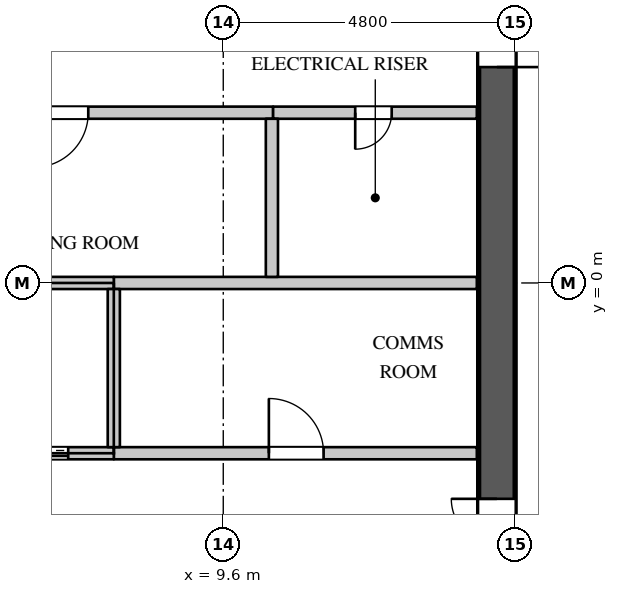
"""IFC4 building model, lengths in metres.
Left out: names, types, materials, properties, quantities, classifications, styles, units other than length and angle.
Written with IfcOpenShell. Run it as: python <this file> out.ifc"""

import sys

from ifc_helpers import new_model, si_unit, direction, frame, frame_2d, origin, place, context, subcontext, project, spatial, rectangle, extrude, element, fill, save


model = new_model("IFC4")
c1 = context("Model", 3, precision=1e-05, world=origin(), true_north=direction((0.0, 1.0)))
c2 = subcontext(c1, "Body", "Model", "MODEL_VIEW")
j1 = project(units=[si_unit("LENGTHUNIT", "METRE"), si_unit("PLANEANGLEUNIT", "RADIAN")], contexts=[c1])
p1 = place(None, origin())
s1 = spatial("IfcSite", under=j1, at=p1, CompositionType="ELEMENT")
p2 = place(p1, origin())
s2 = spatial("IfcBuilding", under=s1, at=p2, CompositionType="ELEMENT")
p3 = place(p2, frame((0.0, 0.0, 306.3)))
s3 = spatial("IfcBuildingStorey", under=s2, at=p3, CompositionType="ELEMENT", Elevation=306.3)
p4 = place(p3, frame((14.1, -11.4, 0.0), z_axis=(0.0, 0.0, 1.0), x_axis=(0.0, 1.0, 0.0)))
e1 = element("IfcWall", 1, at=p4, inside=s3, PredefinedType="SHEAR", context=c2, shape_type="SweptSolid", body=[
    extrude(rectangle(XDim=22.8, YDim=0.6, at=frame_2d((11.4, 0.0))), origin(), (0.0, 0.0, 1.0), 4.2),
])
p5 = place(p4, frame((20.45, 0.0, 0.0)))
e2 = element("IfcOpeningElement", 2, at=p5, cuts=e1, PredefinedType="OPENING", context=c2, shape_type="SweptSolid", body=[
    extrude(rectangle(XDim=1.1, YDim=2.2, at=frame_2d((0.55, 1.1))), frame((0.0, 0.31, 0.0), z_axis=(0.0, -1.0, 0.0), x_axis=(1.0, 0.0, 0.0)), (0.0, 0.0, 1.0), 0.62),
])
p6 = place(p4, frame((1.25, 0.0, 0.0)))
e3 = element("IfcOpeningElement", 3, at=p6, cuts=e1, PredefinedType="OPENING", context=c2, shape_type="SweptSolid", body=[
    extrude(rectangle(XDim=1.1, YDim=2.2, at=frame_2d((0.55, 1.1))), frame((0.0, 0.31, 0.0), z_axis=(0.0, -1.0, 0.0), x_axis=(1.0, 0.0, 0.0)), (0.0, 0.0, 1.0), 0.62),
])
p7 = place(p4, frame((14.95, 0.0, 0.0)))
e4 = element("IfcOpeningElement", 4, at=p7, cuts=e1, PredefinedType="OPENING", context=c2, shape_type="SweptSolid", body=[
    extrude(rectangle(XDim=1.5, YDim=2.4, at=frame_2d((0.75, 1.2))), frame((0.0, 0.31, 0.0), z_axis=(0.0, -1.0, 0.0), x_axis=(1.0, 0.0, 0.0)), (0.0, 0.0, 1.0), 0.62),
])
p8 = place(p4, frame((6.35, 0.0, 0.0)))
e5 = element("IfcOpeningElement", 5, at=p8, cuts=e1, PredefinedType="OPENING", context=c2, shape_type="SweptSolid", body=[
    extrude(rectangle(XDim=1.5, YDim=2.4, at=frame_2d((0.75, 1.2))), frame((0.0, 0.31, 0.0), z_axis=(0.0, -1.0, 0.0), x_axis=(1.0, 0.0, 0.0)), (0.0, 0.0, 1.0), 0.62),
])
p9 = place(p3, frame((-7.82, 2.8, 0.0), z_axis=(0.0, 0.0, 1.0), x_axis=(1.0, 0.0, 0.0)))
e6 = element("IfcWall", 6, at=p9, inside=s3, PredefinedType="PARTITIONING", context=c2, shape_type="SweptSolid", body=[
    extrude(rectangle(XDim=18.24, YDim=0.2, at=frame_2d((9.12, 0.0))), origin(), (0.0, 0.0, 1.0), 3.9),
])
p10 = place(p9, frame((2.0, 0.0, 0.0)))
e7 = element("IfcOpeningElement", 7, at=p10, cuts=e6, PredefinedType="OPENING", context=c2, shape_type="SweptSolid", body=[
    extrude(rectangle(XDim=0.9, YDim=2.2, at=frame_2d((0.45, 1.1))), frame((0.0, 0.11, 0.0), z_axis=(0.0, -1.0, 0.0), x_axis=(1.0, 0.0, 0.0)), (0.0, 0.0, 1.0), 0.22),
])
p11 = place(p9, frame((6.1, 0.0, 0.0)))
e8 = element("IfcOpeningElement", 8, at=p11, cuts=e6, PredefinedType="OPENING", context=c2, shape_type="SweptSolid", body=[
    extrude(rectangle(XDim=0.9, YDim=2.2, at=frame_2d((0.45, 1.1))), frame((0.0, 0.11, 0.0), z_axis=(0.0, -1.0, 0.0), x_axis=(1.0, 0.0, 0.0)), (0.0, 0.0, 1.0), 0.22),
])
p12 = place(p9, frame((9.35, 0.0, 0.0)))
e9 = element("IfcOpeningElement", 9, at=p12, cuts=e6, PredefinedType="OPENING", context=c2, shape_type="SweptSolid", body=[
    extrude(rectangle(XDim=0.9, YDim=2.2, at=frame_2d((0.45, 1.1))), frame((0.0, 0.11, 0.0), z_axis=(0.0, -1.0, 0.0), x_axis=(1.0, 0.0, 0.0)), (0.0, 0.0, 1.0), 0.22),
])
p13 = place(p9, frame((14.3, 0.0, 0.0)))
e10 = element("IfcOpeningElement", 10, at=p13, cuts=e6, PredefinedType="OPENING", context=c2, shape_type="SweptSolid", body=[
    extrude(rectangle(XDim=0.9, YDim=2.2, at=frame_2d((0.45, 1.1))), frame((0.0, 0.11, 0.0), z_axis=(0.0, -1.0, 0.0), x_axis=(1.0, 0.0, 0.0)), (0.0, 0.0, 1.0), 0.22),
])
p14 = place(p3, frame((7.8, -2.8, 0.0), z_axis=(0.0, 0.0, 1.0), x_axis=(1.0, 0.0, 0.0)))
e11 = element("IfcWall", 11, at=p14, inside=s3, PredefinedType="PARTITIONING", context=c2, shape_type="SweptSolid", body=[
    extrude(rectangle(XDim=5.97, YDim=0.2, at=frame_2d((2.985, 0.0))), origin(), (0.0, 0.0, 1.0), 3.9),
])
p15 = place(p14, frame((2.55, 0.0, 0.0)))
e12 = element("IfcOpeningElement", 12, at=p15, cuts=e11, PredefinedType="OPENING", context=c2, shape_type="SweptSolid", body=[
    extrude(rectangle(XDim=0.9, YDim=2.2, at=frame_2d((0.45, 1.1))), frame((0.0, 0.11, 0.0), z_axis=(0.0, -1.0, 0.0), x_axis=(1.0, 0.0, 0.0)), (0.0, 0.0, 1.0), 0.22),
])
p16 = place(p3, frame((7.8, 0.0, 0.0), z_axis=(0.0, 0.0, 1.0), x_axis=(1.0, 0.0, 0.0)))
e13 = element("IfcWall", 13, at=p16, inside=s3, PredefinedType="PARTITIONING", context=c2, shape_type="SweptSolid", body=[
    extrude(rectangle(XDim=5.97, YDim=0.2, at=frame_2d((2.985, 0.0))), origin(), (0.0, 0.0, 1.0), 3.9),
])
p17 = place(p3, frame((10.42, 2.8, 0.0), z_axis=(0.0, 0.0, 1.0), x_axis=(1.0, 0.0, 0.0)))
e14 = element("IfcWall", 14, at=p17, inside=s3, PredefinedType="PARTITIONING", context=c2, shape_type="SweptSolid", body=[
    extrude(rectangle(XDim=3.35, YDim=0.2, at=frame_2d((1.675, 0.0))), origin(), (0.0, 0.0, 1.0), 3.9),
])
p18 = place(p17, frame((1.35, 0.0, 0.0)))
e15 = element("IfcOpeningElement", 15, at=p18, cuts=e14, PredefinedType="OPENING", context=c2, shape_type="SweptSolid", body=[
    extrude(rectangle(XDim=0.6, YDim=2.0, at=frame_2d((0.3, 1.0))), frame((0.0, 0.11, 0.0), z_axis=(0.0, -1.0, 0.0), x_axis=(1.0, 0.0, 0.0)), (0.0, 0.0, 1.0), 0.22),
])
p19 = place(p3, frame((10.4, 0.1, 0.0), z_axis=(0.0, 0.0, 1.0), x_axis=(0.0, 1.0, 0.0)))
e16 = element("IfcWall", 16, at=p19, inside=s3, PredefinedType="PARTITIONING", context=c2, shape_type="SweptSolid", body=[
    extrude(rectangle(XDim=2.6, YDim=0.2, at=frame_2d((1.3, 0.0))), origin(), (0.0, 0.0, 1.0), 3.9),
])
p20 = place(p3, frame((-13.77, 0.0, 0.0), z_axis=(0.0, 0.0, 1.0), x_axis=(1.0, 0.0, 0.0)))
e17 = element("IfcWall", 17, at=p20, inside=s3, PredefinedType="PARTITIONING", context=c2, shape_type="SweptSolid", body=[
    extrude(rectangle(XDim=21.57, YDim=0.2, at=frame_2d((10.785, 0.0))), origin(), (0.0, 0.0, 1.0), 3.9),
])
p21 = place(p3, frame((-10.4, -2.8, 0.0), z_axis=(0.0, 0.0, 1.0), x_axis=(1.0, 0.0, 0.0)))
e18 = element("IfcWall", 18, at=p21, inside=s3, PredefinedType="PARTITIONING", context=c2, shape_type="SweptSolid", body=[
    extrude(rectangle(XDim=18.2, YDim=0.2, at=frame_2d((9.1, 0.0))), origin(), (0.0, 0.0, 1.0), 3.9),
])
p22 = place(p21, frame((0.75, 0.0, 0.0)))
e19 = element("IfcOpeningElement", 19, at=p22, cuts=e18, PredefinedType="OPENING", context=c2, shape_type="SweptSolid", body=[
    extrude(rectangle(XDim=1.1, YDim=2.2, at=frame_2d((0.55, 1.1))), frame((0.0, 0.11, 0.0), z_axis=(0.0, -1.0, 0.0), x_axis=(1.0, 0.0, 0.0)), (0.0, 0.0, 1.0), 0.22),
])
p23 = place(p21, frame((3.35, 0.0, 0.0)))
e20 = element("IfcOpeningElement", 20, at=p23, cuts=e18, PredefinedType="OPENING", context=c2, shape_type="SweptSolid", body=[
    extrude(rectangle(XDim=1.1, YDim=2.2, at=frame_2d((0.55, 1.1))), frame((0.0, 0.11, 0.0), z_axis=(0.0, -1.0, 0.0), x_axis=(1.0, 0.0, 0.0)), (0.0, 0.0, 1.0), 0.22),
])
p24 = place(p21, frame((5.95, 0.0, 0.0)))
e21 = element("IfcOpeningElement", 21, at=p24, cuts=e18, PredefinedType="OPENING", context=c2, shape_type="SweptSolid", body=[
    extrude(rectangle(XDim=1.1, YDim=2.2, at=frame_2d((0.55, 1.1))), frame((0.0, 0.11, 0.0), z_axis=(0.0, -1.0, 0.0), x_axis=(1.0, 0.0, 0.0)), (0.0, 0.0, 1.0), 0.22),
])
p25 = place(p21, frame((8.55, 0.0, 0.0)))
e22 = element("IfcOpeningElement", 22, at=p25, cuts=e18, PredefinedType="OPENING", context=c2, shape_type="SweptSolid", body=[
    extrude(rectangle(XDim=1.1, YDim=2.2, at=frame_2d((0.55, 1.1))), frame((0.0, 0.11, 0.0), z_axis=(0.0, -1.0, 0.0), x_axis=(1.0, 0.0, 0.0)), (0.0, 0.0, 1.0), 0.22),
])
p26 = place(p21, frame((11.15, 0.0, 0.0)))
e23 = element("IfcOpeningElement", 23, at=p26, cuts=e18, PredefinedType="OPENING", context=c2, shape_type="SweptSolid", body=[
    extrude(rectangle(XDim=1.1, YDim=2.2, at=frame_2d((0.55, 1.1))), frame((0.0, 0.11, 0.0), z_axis=(0.0, -1.0, 0.0), x_axis=(1.0, 0.0, 0.0)), (0.0, 0.0, 1.0), 0.22),
])
p27 = place(p21, frame((13.75, 0.0, 0.0)))
e24 = element("IfcOpeningElement", 24, at=p27, cuts=e18, PredefinedType="OPENING", context=c2, shape_type="SweptSolid", body=[
    extrude(rectangle(XDim=1.1, YDim=2.2, at=frame_2d((0.55, 1.1))), frame((0.0, 0.11, 0.0), z_axis=(0.0, -1.0, 0.0), x_axis=(1.0, 0.0, 0.0)), (0.0, 0.0, 1.0), 0.22),
])
p28 = place(p21, frame((16.35, 0.0, 0.0)))
e25 = element("IfcOpeningElement", 25, at=p28, cuts=e18, PredefinedType="OPENING", context=c2, shape_type="SweptSolid", body=[
    extrude(rectangle(XDim=1.1, YDim=2.2, at=frame_2d((0.55, 1.1))), frame((0.0, 0.11, 0.0), z_axis=(0.0, -1.0, 0.0), x_axis=(1.0, 0.0, 0.0)), (0.0, 0.0, 1.0), 0.22),
])
p29 = place(p3, frame((7.8, -2.7, 0.0), z_axis=(0.0, 0.0, 1.0), x_axis=(0.0, 1.0, 0.0)))
e26 = element("IfcWall", 26, at=p29, inside=s3, PredefinedType="PARTITIONING", context=c2, shape_type="SweptSolid", body=[
    extrude(rectangle(XDim=2.6, YDim=0.2, at=frame_2d((1.3, 0.0))), origin(), (0.0, 0.0, 1.0), 3.9),
])
p30 = place(p18, origin())
e27 = element("IfcDoor", 27, at=p30, inside=s3, OperationType="SINGLE_SWING_RIGHT", PredefinedType="DOOR", context=c2, shape_type="SweptSolid", body=[
    extrude(rectangle(XDim=0.6, YDim=2.0, at=frame_2d((0.3, 1.0))), frame((0.0, 0.025, 0.0), z_axis=(0.0, -1.0, 0.0), x_axis=(1.0, 0.0, 0.0)), (0.0, 0.0, 1.0), 0.05),
])
fill(e15, e27)
p31 = place(p15, origin())
e28 = element("IfcDoor", 28, at=p31, inside=s3, OperationType="SINGLE_SWING_LEFT", PredefinedType="DOOR", context=c2, shape_type="SweptSolid", body=[
    extrude(rectangle(XDim=0.9, YDim=2.2, at=frame_2d((0.45, 1.1))), frame((0.0, 0.025, 0.0), z_axis=(0.0, -1.0, 0.0), x_axis=(1.0, 0.0, 0.0)), (0.0, 0.0, 1.0), 0.05),
])
fill(e12, e28)
p32 = place(p13, origin())
e29 = element("IfcDoor", 29, at=p32, inside=s3, OperationType="SINGLE_SWING_RIGHT", PredefinedType="DOOR", context=c2, shape_type="SweptSolid", body=[
    extrude(rectangle(XDim=0.9, YDim=2.2, at=frame_2d((0.45, 1.1))), frame((0.0, 0.025, 0.0), z_axis=(0.0, -1.0, 0.0), x_axis=(1.0, 0.0, 0.0)), (0.0, 0.0, 1.0), 0.05),
])
fill(e10, e29)
p33 = place(p28, origin())
e30 = element("IfcDoor", 30, at=p33, inside=s3, OperationType="DOUBLE_DOOR_SLIDING", PredefinedType="DOOR", context=c2, shape_type="SweptSolid", body=[
    extrude(rectangle(XDim=1.1, YDim=2.2, at=frame_2d((0.55, 1.1))), frame((0.0, 0.025, 0.0), z_axis=(0.0, -1.0, 0.0), x_axis=(1.0, 0.0, 0.0)), (0.0, 0.0, 1.0), 0.05),
])
fill(e25, e30)
p34 = place(p7, origin())
e31 = element("IfcDoor", 31, at=p34, inside=s3, OperationType="DOUBLE_DOOR_SINGLE_SWING", PredefinedType="DOOR", context=c2, shape_type="SweptSolid", body=[
    extrude(rectangle(XDim=1.5, YDim=2.4, at=frame_2d((0.75, 1.2))), frame((0.0, -0.245, 0.0), z_axis=(0.0, -1.0, 0.0), x_axis=(1.0, 0.0, 0.0)), (0.0, 0.0, 1.0), 0.05),
])
fill(e4, e31)
p35 = place(p8, origin())
e32 = element("IfcDoor", 32, at=p35, inside=s3, OperationType="DOUBLE_DOOR_SINGLE_SWING", PredefinedType="DOOR", context=c2, shape_type="SweptSolid", body=[
    extrude(rectangle(XDim=1.5, YDim=2.4, at=frame_2d((0.75, 1.2))), frame((0.0, 0.295, 0.0), z_axis=(0.0, -1.0, 0.0), x_axis=(1.0, 0.0, 0.0)), (0.0, 0.0, 1.0), 0.05),
])
fill(e5, e32)
save(model, sys.argv[1])
